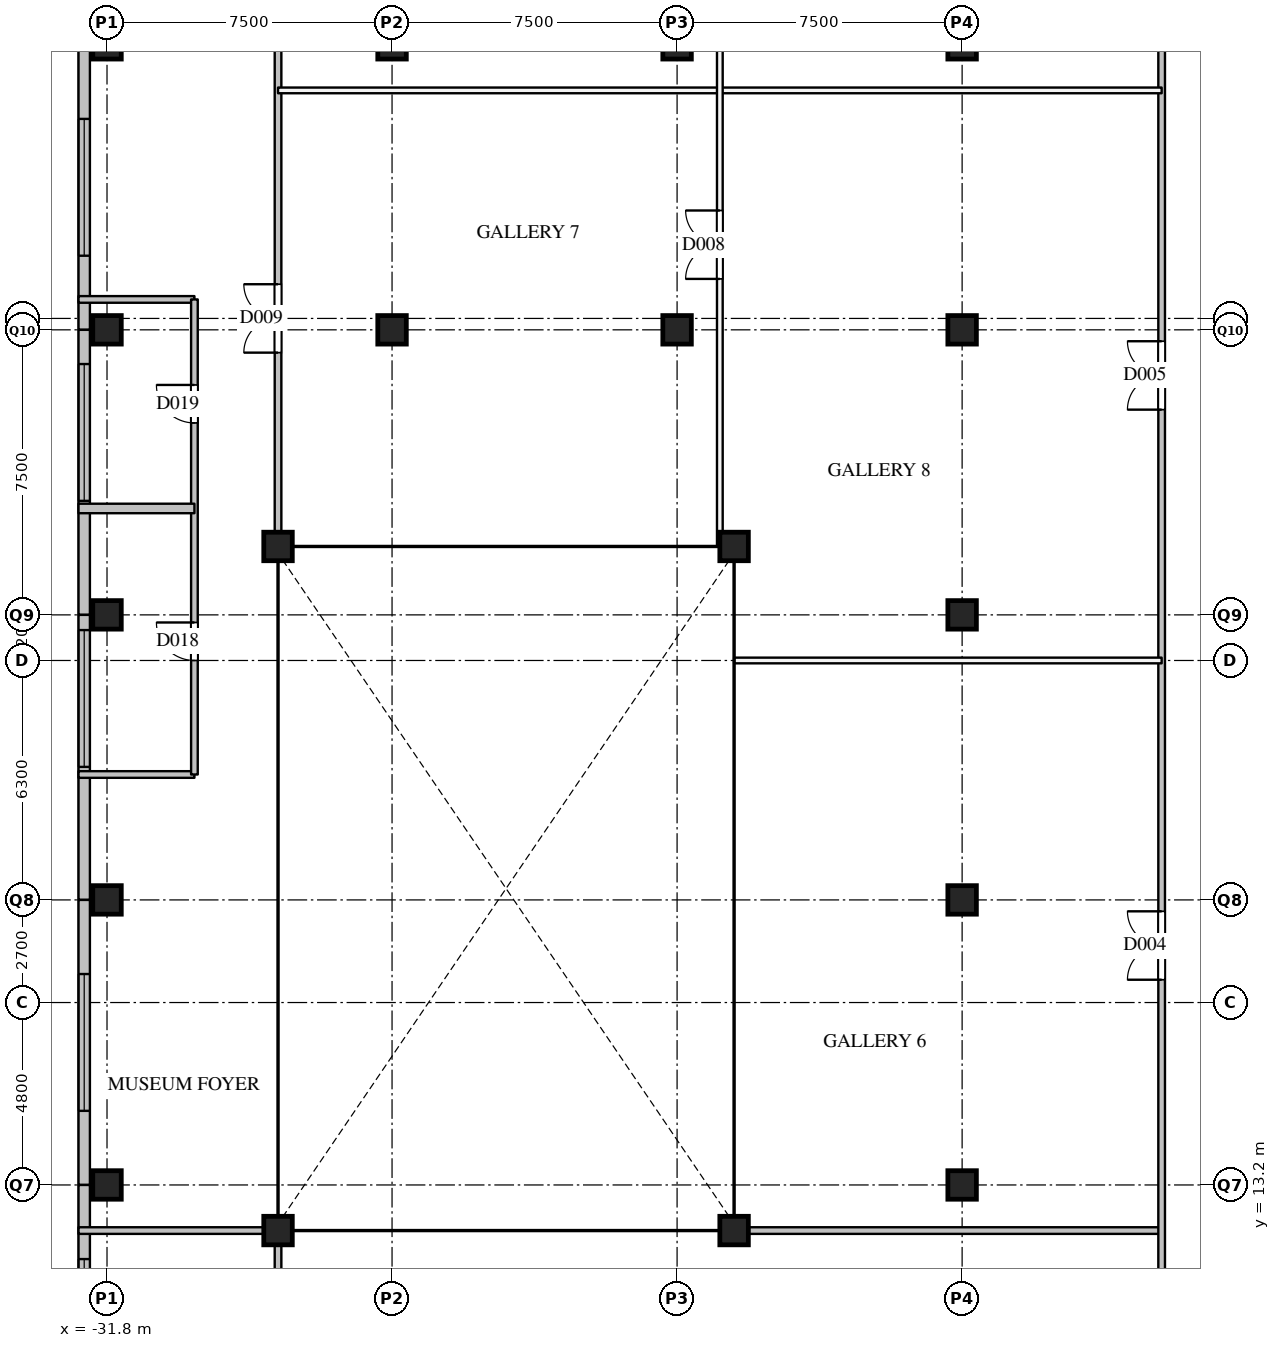
"""IFC4 building model, lengths in metres.
Left out: names, types, materials, properties, quantities, classifications, styles, units other than length and angle.
Written with IfcOpenShell. Run it as: python <this file> out.ifc"""

import sys

from ifc_helpers import new_model, si_unit, direction, frame, frame_2d, origin, origin_2d, place, context, subcontext, project, spatial, rectangle, extrude, element, fill, save


model = new_model("IFC4")
c1 = context("Model", 3, precision=1e-05, world=origin(), true_north=direction((0.0, 1.0)))
c2 = subcontext(c1, "Body", "Model", "MODEL_VIEW")
j1 = project(units=[si_unit("LENGTHUNIT", "METRE"), si_unit("PLANEANGLEUNIT", "RADIAN")], contexts=[c1])
p1 = place(None, origin())
s1 = spatial("IfcSite", under=j1, at=p1, CompositionType="ELEMENT")
p2 = place(p1, origin())
s2 = spatial("IfcBuilding", under=s1, at=p2, CompositionType="ELEMENT")
p3 = place(p2, frame((0.0, 0.0, 8.0)))
s3 = spatial("IfcBuildingStorey", under=s2, at=p3, CompositionType="ELEMENT", Elevation=8.0)
for number, where, z_axis, x_axis in (
    (1, (-31.8, 13.2, 0.0), (0.0, 0.0, 1.0), (1.0, 0.0, 0.0)),
    (2, (-31.8, 20.7, 0.0), (0.0, 0.0, 1.0), (1.0, 0.0, 0.0)),
    (3, (-31.8, 28.2, 0.0), (0.0, 0.0, 1.0), (1.0, 0.0, 0.0)),
    (4, (-31.8, 35.7, 0.0), (0.0, 0.0, 1.0), (1.0, 0.0, 0.0)),
    (5, (-31.8, 43.2, 0.0), (0.0, 0.0, 1.0), (1.0, 0.0, 0.0)),
    (6, (-24.3, 35.7, 0.0), (0.0, 0.0, 1.0), (1.0, 0.0, 0.0)),
    (7, (-24.3, 43.2, 0.0), (0.0, 0.0, 1.0), (1.0, 0.0, 0.0)),
    (8, (-16.8, 35.7, 0.0), (0.0, 0.0, 1.0), (1.0, 0.0, 0.0)),
    (9, (-16.8, 43.2, 0.0), (0.0, 0.0, 1.0), (1.0, 0.0, 0.0)),
    (10, (-9.3, 13.2, 0.0), (0.0, 0.0, 1.0), (1.0, 0.0, 0.0)),
    (11, (-9.3, 20.7, 0.0), (0.0, 0.0, 1.0), (1.0, 0.0, 0.0)),
    (12, (-9.3, 28.2, 0.0), (0.0, 0.0, 1.0), (1.0, 0.0, 0.0)),
    (13, (-9.3, 35.7, 0.0), (0.0, 0.0, 1.0), (1.0, 0.0, 0.0)),
    (14, (-9.3, 43.2, 0.0), (0.0, 0.0, 1.0), (1.0, 0.0, 0.0)),
    (15, (-27.3, 12.0, 0.0), (0.0, 0.0, 1.0), (1.0, 0.0, 0.0)),
    (16, (-15.3, 12.0, 0.0), (0.0, 0.0, 1.0), (1.0, 0.0, 0.0)),
    (17, (-15.3, 30.0, 0.0), (0.0, 0.0, 1.0), (1.0, 0.0, 0.0)),
    (18, (-27.3, 30.0, 0.0), (0.0, 0.0, 1.0), (1.0, 0.0, 0.0)),
):
    element("IfcColumn", number, at=place(p3, frame(where, z_axis=z_axis, x_axis=x_axis)), inside=s3, PredefinedType="COLUMN", context=c2, shape_type="SweptSolid", body=[
        extrude(rectangle(XDim=0.75, YDim=0.75, at=origin_2d()), origin(), (0.0, 0.0, 1.0), 6.0),
    ])
p4 = place(p3, frame((-32.4, 43.2, 0.0), z_axis=(0.0, 0.0, 1.0), x_axis=(0.0, -1.0, 0.0)))
e19 = element("IfcWall", 19, at=p4, inside=s3, PredefinedType="SOLIDWALL", context=c2, shape_type="SweptSolid", body=[
    extrude(rectangle(XDim=7.5, YDim=0.3, at=frame_2d((3.75, 0.0))), origin(), (0.0, 0.0, 1.0), 5.59),
])
p5 = place(p4, frame((1.95, 0.0, 2.4)))
e20 = element("IfcOpeningElement", 20, at=p5, cuts=e19, PredefinedType="OPENING", context=c2, shape_type="SweptSolid", body=[
    extrude(rectangle(XDim=3.6, YDim=1.2, at=frame_2d((1.8, 0.6))), frame((0.0, 0.16, 0.0), z_axis=(0.0, -1.0, 0.0), x_axis=(1.0, 0.0, 0.0)), (0.0, 0.0, 1.0), 0.32),
])
p6 = place(p3, frame((-32.4, 35.7, 0.0), z_axis=(0.0, 0.0, 1.0), x_axis=(0.0, -1.0, 0.0)))
e21 = element("IfcWall", 21, at=p6, inside=s3, PredefinedType="SOLIDWALL", context=c2, shape_type="SweptSolid", body=[
    extrude(rectangle(XDim=7.5, YDim=0.3, at=frame_2d((3.75, 0.0))), origin(), (0.0, 0.0, 1.0), 5.59),
])
p7 = place(p6, frame((0.9, 0.0, 2.4)))
e22 = element("IfcOpeningElement", 22, at=p7, cuts=e21, PredefinedType="OPENING", context=c2, shape_type="SweptSolid", body=[
    extrude(rectangle(XDim=3.6, YDim=1.2, at=frame_2d((1.8, 0.6))), frame((0.0, 0.16, 0.0), z_axis=(0.0, -1.0, 0.0), x_axis=(1.0, 0.0, 0.0)), (0.0, 0.0, 1.0), 0.32),
])
p8 = place(p3, frame((-32.4, 28.2, 0.0), z_axis=(0.0, 0.0, 1.0), x_axis=(0.0, -1.0, 0.0)))
e23 = element("IfcWall", 23, at=p8, inside=s3, PredefinedType="SOLIDWALL", context=c2, shape_type="SweptSolid", body=[
    extrude(rectangle(XDim=7.5, YDim=0.3, at=frame_2d((3.75, 0.0))), origin(), (0.0, 0.0, 1.0), 5.59),
])
p9 = place(p8, frame((0.4, 0.0, 2.4)))
e24 = element("IfcOpeningElement", 24, at=p9, cuts=e23, PredefinedType="OPENING", context=c2, shape_type="SweptSolid", body=[
    extrude(rectangle(XDim=3.6, YDim=1.2, at=frame_2d((1.8, 0.6))), frame((0.0, 0.16, 0.0), z_axis=(0.0, -1.0, 0.0), x_axis=(1.0, 0.0, 0.0)), (0.0, 0.0, 1.0), 0.32),
])
p10 = place(p3, frame((-32.4, 20.7, 0.0), z_axis=(0.0, 0.0, 1.0), x_axis=(0.0, -1.0, 0.0)))
e25 = element("IfcWall", 25, at=p10, inside=s3, PredefinedType="SOLIDWALL", context=c2, shape_type="SweptSolid", body=[
    extrude(rectangle(XDim=7.5, YDim=0.3, at=frame_2d((3.75, 0.0))), origin(), (0.0, 0.0, 1.0), 5.59),
])
p11 = place(p10, frame((1.95, 0.0, 2.4)))
e26 = element("IfcOpeningElement", 26, at=p11, cuts=e25, PredefinedType="OPENING", context=c2, shape_type="SweptSolid", body=[
    extrude(rectangle(XDim=3.6, YDim=1.2, at=frame_2d((1.8, 0.6))), frame((0.0, 0.16, 0.0), z_axis=(0.0, -1.0, 0.0), x_axis=(1.0, 0.0, 0.0)), (0.0, 0.0, 1.0), 0.32),
])
p12 = place(p3, frame((-32.4, 13.2, 0.0), z_axis=(0.0, 0.0, 1.0), x_axis=(0.0, -1.0, 0.0)))
e27 = element("IfcWall", 27, at=p12, inside=s3, PredefinedType="SOLIDWALL", context=c2, shape_type="SweptSolid", body=[
    extrude(rectangle(XDim=7.5, YDim=0.3, at=frame_2d((3.75, 0.0))), origin(), (0.0, 0.0, 1.0), 5.59),
])
p13 = place(p12, frame((1.95, 0.0, 2.4)))
e28 = element("IfcOpeningElement", 28, at=p13, cuts=e27, PredefinedType="OPENING", context=c2, shape_type="SweptSolid", body=[
    extrude(rectangle(XDim=3.6, YDim=1.2, at=frame_2d((1.8, 0.6))), frame((0.0, 0.16, 0.0), z_axis=(0.0, -1.0, 0.0), x_axis=(1.0, 0.0, 0.0)), (0.0, 0.0, 1.0), 0.32),
])
p14 = place(p3, frame((-32.55, 12.0, 0.0), z_axis=(0.0, 0.0, 1.0), x_axis=(1.0, 0.0, 0.0)))
e29 = element("IfcWall", 29, at=p14, inside=s3, PredefinedType="PARTITIONING", context=c2, shape_type="SweptSolid", body=[
    extrude(rectangle(XDim=5.25, YDim=0.175, at=frame_2d((2.625, 0.0))), origin(), (0.0, 0.0, 1.0), 4.79),
])
p15 = place(p3, frame((-15.3, 12.0, 0.0), z_axis=(0.0, 0.0, 1.0), x_axis=(1.0, 0.0, 0.0)))
e30 = element("IfcWall", 30, at=p15, inside=s3, PredefinedType="PARTITIONING", context=c2, shape_type="SweptSolid", body=[
    extrude(rectangle(XDim=11.25, YDim=0.175, at=frame_2d((5.625, 0.0))), origin(), (0.0, 0.0, 1.0), 4.79),
])
for number, where, z_axis, x_axis in (
    (31, (-32.55, 24.0, 0.0), (0.0, 0.0, 1.0), (1.0, 0.0, 0.0)),
    (32, (-32.55, 36.5, 0.0), (0.0, 0.0, 1.0), (1.0, 0.0, 0.0)),
):
    element("IfcWall", number, at=place(p3, frame(where, z_axis=z_axis, x_axis=x_axis)), inside=s3, PredefinedType="PARTITIONING", context=c2, shape_type="SweptSolid", body=[
        extrude(rectangle(XDim=3.05, YDim=0.175, at=frame_2d((1.525, 0.0))), origin(), (0.0, 0.0, 1.0), 4.79),
    ])
p16 = place(p3, frame((-29.5, 24.0, 0.0), z_axis=(0.0, 0.0, 1.0), x_axis=(0.0, 1.0, 0.0)))
e33 = element("IfcWall", 33, at=p16, inside=s3, PredefinedType="PARTITIONING", context=c2, shape_type="SweptSolid", body=[
    extrude(rectangle(XDim=12.5, YDim=0.175, at=frame_2d((6.25, 0.0))), origin(), (0.0, 0.0, 1.0), 4.79),
])
p17 = place(p16, frame((3.0, 0.0, 0.0)))
e34 = element("IfcOpeningElement", 34, at=p17, cuts=e33, PredefinedType="OPENING", context=c2, shape_type="SweptSolid", body=[
    extrude(rectangle(XDim=1.0, YDim=2.1, at=frame_2d((0.5, 1.05))), frame((0.0, 0.097, 0.0), z_axis=(0.0, -1.0, 0.0), x_axis=(1.0, 0.0, 0.0)), (0.0, 0.0, 1.0), 0.195),
])
p18 = place(p16, frame((9.25, 0.0, 0.0)))
e35 = element("IfcOpeningElement", 35, at=p18, cuts=e33, PredefinedType="OPENING", context=c2, shape_type="SweptSolid", body=[
    extrude(rectangle(XDim=1.0, YDim=2.1, at=frame_2d((0.5, 1.05))), frame((0.0, 0.097, 0.0), z_axis=(0.0, -1.0, 0.0), x_axis=(1.0, 0.0, 0.0)), (0.0, 0.0, 1.0), 0.195),
])
p19 = place(p3, frame((-27.3, 3.0, 0.0), z_axis=(0.0, 0.0, 1.0), x_axis=(0.0, 1.0, 0.0)))
e36 = element("IfcWall", 36, at=p19, inside=s3, PredefinedType="PARTITIONING", context=c2, shape_type="SweptSolid", body=[
    extrude(rectangle(XDim=9.0, YDim=0.175, at=frame_2d((4.5, 0.0))), origin(), (0.0, 0.0, 1.0), 4.79),
])
p20 = place(p19, frame((4.0, 0.0, 0.0)))
e37 = element("IfcOpeningElement", 37, at=p20, cuts=e36, PredefinedType="OPENING", context=c2, shape_type="SweptSolid", body=[
    extrude(rectangle(XDim=1.0, YDim=2.1, at=frame_2d((0.5, 1.05))), frame((0.0, 0.097, 0.0), z_axis=(0.0, -1.0, 0.0), x_axis=(1.0, 0.0, 0.0)), (0.0, 0.0, 1.0), 0.195),
])
p21 = place(p3, frame((-27.3, 30.0, 0.0), z_axis=(0.0, 0.0, 1.0), x_axis=(0.0, 1.0, 0.0)))
e38 = element("IfcWall", 38, at=p21, inside=s3, PredefinedType="PARTITIONING", context=c2, shape_type="SweptSolid", body=[
    extrude(rectangle(XDim=17.35, YDim=0.175, at=frame_2d((8.675, 0.0))), origin(), (0.0, 0.0, 1.0), 4.79),
])
p22 = place(p21, frame((5.1, 0.0, 0.0)))
e39 = element("IfcOpeningElement", 39, at=p22, cuts=e38, PredefinedType="OPENING", context=c2, shape_type="SweptSolid", body=[
    extrude(rectangle(XDim=1.8, YDim=2.1, at=frame_2d((0.9, 1.05))), frame((0.0, 0.097, 0.0), z_axis=(0.0, -1.0, 0.0), x_axis=(1.0, 0.0, 0.0)), (0.0, 0.0, 1.0), 0.195),
])
p23 = place(p3, frame((-4.05, -4.05, 0.0), z_axis=(0.0, 0.0, 1.0), x_axis=(0.0, 1.0, 0.0)))
e40 = element("IfcWall", 40, at=p23, inside=s3, PredefinedType="PARTITIONING", context=c2, shape_type="SweptSolid", body=[
    extrude(rectangle(XDim=63.0, YDim=0.175, at=frame_2d((31.5, 0.0))), origin(), (0.0, 0.0, 1.0), 4.79),
])
p24 = place(p23, frame((7.125, 0.0, 0.0)))
e41 = element("IfcOpeningElement", 41, at=p24, cuts=e40, PredefinedType="OPENING", context=c2, shape_type="SweptSolid", body=[
    extrude(rectangle(XDim=1.8, YDim=2.1, at=frame_2d((0.9, 1.05))), frame((0.0, 0.097, 0.0), z_axis=(0.0, -1.0, 0.0), x_axis=(1.0, 0.0, 0.0)), (0.0, 0.0, 1.0), 0.195),
])
p25 = place(p23, frame((60.775, 0.0, 0.0)))
e42 = element("IfcOpeningElement", 42, at=p25, cuts=e40, PredefinedType="OPENING", context=c2, shape_type="SweptSolid", body=[
    extrude(rectangle(XDim=1.8, YDim=2.1, at=frame_2d((0.9, 1.05))), frame((0.0, 0.097, 0.0), z_axis=(0.0, -1.0, 0.0), x_axis=(1.0, 0.0, 0.0)), (0.0, 0.0, 1.0), 0.195),
])
p26 = place(p23, frame((22.65, 0.0, 0.0)))
e43 = element("IfcOpeningElement", 43, at=p26, cuts=e40, PredefinedType="OPENING", context=c2, shape_type="SweptSolid", body=[
    extrude(rectangle(XDim=1.8, YDim=2.1, at=frame_2d((0.9, 1.05))), frame((0.0, 0.097, 0.0), z_axis=(0.0, -1.0, 0.0), x_axis=(1.0, 0.0, 0.0)), (0.0, 0.0, 1.0), 0.195),
])
p27 = place(p23, frame((37.65, 0.0, 0.0)))
e44 = element("IfcOpeningElement", 44, at=p27, cuts=e40, PredefinedType="OPENING", context=c2, shape_type="SweptSolid", body=[
    extrude(rectangle(XDim=1.8, YDim=2.1, at=frame_2d((0.9, 1.05))), frame((0.0, 0.097, 0.0), z_axis=(0.0, -1.0, 0.0), x_axis=(1.0, 0.0, 0.0)), (0.0, 0.0, 1.0), 0.195),
])
p28 = place(p23, frame((52.3, 0.0, 0.0)))
e45 = element("IfcOpeningElement", 45, at=p28, cuts=e40, PredefinedType="OPENING", context=c2, shape_type="SweptSolid", body=[
    extrude(rectangle(XDim=1.8, YDim=2.1, at=frame_2d((0.9, 1.05))), frame((0.0, 0.097, 0.0), z_axis=(0.0, -1.0, 0.0), x_axis=(1.0, 0.0, 0.0)), (0.0, 0.0, 1.0), 0.195),
])
p29 = place(p3, frame((-15.3, 27.0, 0.0), z_axis=(0.0, 0.0, 1.0), x_axis=(1.0, 0.0, 0.0)))
e46 = element("IfcWall", 46, at=p29, inside=s3, PredefinedType="PARTITIONING", context=c2, shape_type="SweptSolid", body=[
    extrude(rectangle(XDim=11.25, YDim=0.15, at=frame_2d((5.625, 0.0))), origin(), (0.0, 0.0, 1.0), 4.79),
])
p30 = place(p3, frame((-27.3, 42.0, 0.0), z_axis=(0.0, 0.0, 1.0), x_axis=(1.0, 0.0, 0.0)))
e47 = element("IfcWall", 47, at=p30, inside=s3, PredefinedType="PARTITIONING", context=c2, shape_type="SweptSolid", body=[
    extrude(rectangle(XDim=23.25, YDim=0.15, at=frame_2d((11.625, 0.0))), origin(), (0.0, 0.0, 1.0), 4.79),
])
p31 = place(p3, frame((-15.675, 30.0, 0.0), z_axis=(0.0, 0.0, 1.0), x_axis=(0.0, 1.0, 0.0)))
e48 = element("IfcWall", 48, at=p31, inside=s3, PredefinedType="PARTITIONING", context=c2, shape_type="SweptSolid", body=[
    extrude(rectangle(XDim=26.3, YDim=0.15, at=frame_2d((13.15, 0.0))), origin(), (0.0, 0.0, 1.0), 4.79),
])
p32 = place(p31, frame((18.25, 0.0, 0.0)))
e49 = element("IfcOpeningElement", 49, at=p32, cuts=e48, PredefinedType="OPENING", context=c2, shape_type="SweptSolid", body=[
    extrude(rectangle(XDim=1.8, YDim=2.1, at=frame_2d((0.9, 1.05))), frame((0.0, 0.085, 0.0), z_axis=(0.0, -1.0, 0.0), x_axis=(1.0, 0.0, 0.0)), (0.0, 0.0, 1.0), 0.17),
])
p33 = place(p31, frame((7.04, 0.0, 0.0)))
e50 = element("IfcOpeningElement", 50, at=p33, cuts=e48, PredefinedType="OPENING", context=c2, shape_type="SweptSolid", body=[
    extrude(rectangle(XDim=1.8, YDim=2.1, at=frame_2d((0.9, 1.05))), frame((0.0, 0.085, 0.0), z_axis=(0.0, -1.0, 0.0), x_axis=(1.0, 0.0, 0.0)), (0.0, 0.0, 1.0), 0.17),
])
p34 = place(p3, frame((-32.55, 31.0, 0.0), z_axis=(0.0, 0.0, 1.0), x_axis=(1.0, 0.0, 0.0)))
e51 = element("IfcWall", 51, at=p34, inside=s3, PredefinedType="PARTITIONING", context=c2, shape_type="SweptSolid", body=[
    extrude(rectangle(XDim=3.05, YDim=0.25, at=frame_2d((1.525, 0.0))), origin(), (0.0, 0.0, 1.0), 4.79),
])
p35 = place(p5, origin())
e52 = element("IfcWindow", 52, at=p35, inside=s3, PartitioningType="SINGLE_PANEL", PredefinedType="WINDOW", context=c2, shape_type="SweptSolid", body=[
    extrude(rectangle(XDim=3.6, YDim=1.2, at=frame_2d((1.8, 0.6))), frame((0.0, 0.03, 0.0), z_axis=(0.0, -1.0, 0.0), x_axis=(1.0, 0.0, 0.0)), (0.0, 0.0, 1.0), 0.06),
])
fill(e20, e52)
p36 = place(p7, origin())
e53 = element("IfcWindow", 53, at=p36, inside=s3, PartitioningType="SINGLE_PANEL", PredefinedType="WINDOW", context=c2, shape_type="SweptSolid", body=[
    extrude(rectangle(XDim=3.6, YDim=1.2, at=frame_2d((1.8, 0.6))), frame((0.0, 0.03, 0.0), z_axis=(0.0, -1.0, 0.0), x_axis=(1.0, 0.0, 0.0)), (0.0, 0.0, 1.0), 0.06),
])
fill(e22, e53)
p37 = place(p9, origin())
e54 = element("IfcWindow", 54, at=p37, inside=s3, PartitioningType="SINGLE_PANEL", PredefinedType="WINDOW", context=c2, shape_type="SweptSolid", body=[
    extrude(rectangle(XDim=3.6, YDim=1.2, at=frame_2d((1.8, 0.6))), frame((0.0, 0.03, 0.0), z_axis=(0.0, -1.0, 0.0), x_axis=(1.0, 0.0, 0.0)), (0.0, 0.0, 1.0), 0.06),
])
fill(e24, e54)
p38 = place(p11, origin())
e55 = element("IfcWindow", 55, at=p38, inside=s3, PartitioningType="SINGLE_PANEL", PredefinedType="WINDOW", context=c2, shape_type="SweptSolid", body=[
    extrude(rectangle(XDim=3.6, YDim=1.2, at=frame_2d((1.8, 0.6))), frame((0.0, 0.03, 0.0), z_axis=(0.0, -1.0, 0.0), x_axis=(1.0, 0.0, 0.0)), (0.0, 0.0, 1.0), 0.06),
])
fill(e26, e55)
p39 = place(p13, origin())
e56 = element("IfcWindow", 56, at=p39, inside=s3, PartitioningType="SINGLE_PANEL", PredefinedType="WINDOW", context=c2, shape_type="SweptSolid", body=[
    extrude(rectangle(XDim=3.6, YDim=1.2, at=frame_2d((1.8, 0.6))), frame((0.0, 0.03, 0.0), z_axis=(0.0, -1.0, 0.0), x_axis=(1.0, 0.0, 0.0)), (0.0, 0.0, 1.0), 0.06),
])
fill(e28, e56)
p40 = place(p26, origin())
e57 = element("IfcDoor", 57, at=p40, inside=s3, OperationType="DOUBLE_DOOR_SINGLE_SWING", PredefinedType="DOOR", context=c2, shape_type="SweptSolid", body=[
    extrude(rectangle(XDim=1.8, YDim=2.1, at=frame_2d((0.9, 1.05))), frame((0.0, 0.025, 0.0), z_axis=(0.0, -1.0, 0.0), x_axis=(1.0, 0.0, 0.0)), (0.0, 0.0, 1.0), 0.05),
])
fill(e43, e57)
p41 = place(p27, origin())
e58 = element("IfcDoor", 58, at=p41, inside=s3, OperationType="DOUBLE_DOOR_SINGLE_SWING", PredefinedType="DOOR", context=c2, shape_type="SweptSolid", body=[
    extrude(rectangle(XDim=1.8, YDim=2.1, at=frame_2d((0.9, 1.05))), frame((0.0, 0.025, 0.0), z_axis=(0.0, -1.0, 0.0), x_axis=(1.0, 0.0, 0.0)), (0.0, 0.0, 1.0), 0.05),
])
fill(e44, e58)
p42 = place(p33, origin())
e59 = element("IfcDoor", 59, at=p42, inside=s3, OperationType="DOUBLE_DOOR_SINGLE_SWING", PredefinedType="DOOR", context=c2, shape_type="SweptSolid", body=[
    extrude(rectangle(XDim=1.8, YDim=2.1, at=frame_2d((0.9, 1.05))), frame((0.0, 0.025, 0.0), z_axis=(0.0, -1.0, 0.0), x_axis=(1.0, 0.0, 0.0)), (0.0, 0.0, 1.0), 0.05),
])
fill(e50, e59)
p43 = place(p22, origin())
e60 = element("IfcDoor", 60, at=p43, inside=s3, OperationType="DOUBLE_DOOR_SINGLE_SWING", PredefinedType="DOOR", context=c2, shape_type="SweptSolid", body=[
    extrude(rectangle(XDim=1.8, YDim=2.1, at=frame_2d((0.9, 1.05))), frame((0.0, 0.025, 0.0), z_axis=(0.0, -1.0, 0.0), x_axis=(1.0, 0.0, 0.0)), (0.0, 0.0, 1.0), 0.05),
])
fill(e39, e60)
p44 = place(p17, origin())
e61 = element("IfcDoor", 61, at=p44, inside=s3, OperationType="SINGLE_SWING_RIGHT", PredefinedType="DOOR", context=c2, shape_type="SweptSolid", body=[
    extrude(rectangle(XDim=1.0, YDim=2.1, at=frame_2d((0.5, 1.05))), frame((0.0, 0.025, 0.0), z_axis=(0.0, -1.0, 0.0), x_axis=(1.0, 0.0, 0.0)), (0.0, 0.0, 1.0), 0.05),
])
fill(e34, e61)
p45 = place(p18, origin())
e62 = element("IfcDoor", 62, at=p45, inside=s3, OperationType="SINGLE_SWING_RIGHT", PredefinedType="DOOR", context=c2, shape_type="SweptSolid", body=[
    extrude(rectangle(XDim=1.0, YDim=2.1, at=frame_2d((0.5, 1.05))), frame((0.0, 0.025, 0.0), z_axis=(0.0, -1.0, 0.0), x_axis=(1.0, 0.0, 0.0)), (0.0, 0.0, 1.0), 0.05),
])
fill(e35, e62)
save(model, sys.argv[1])
